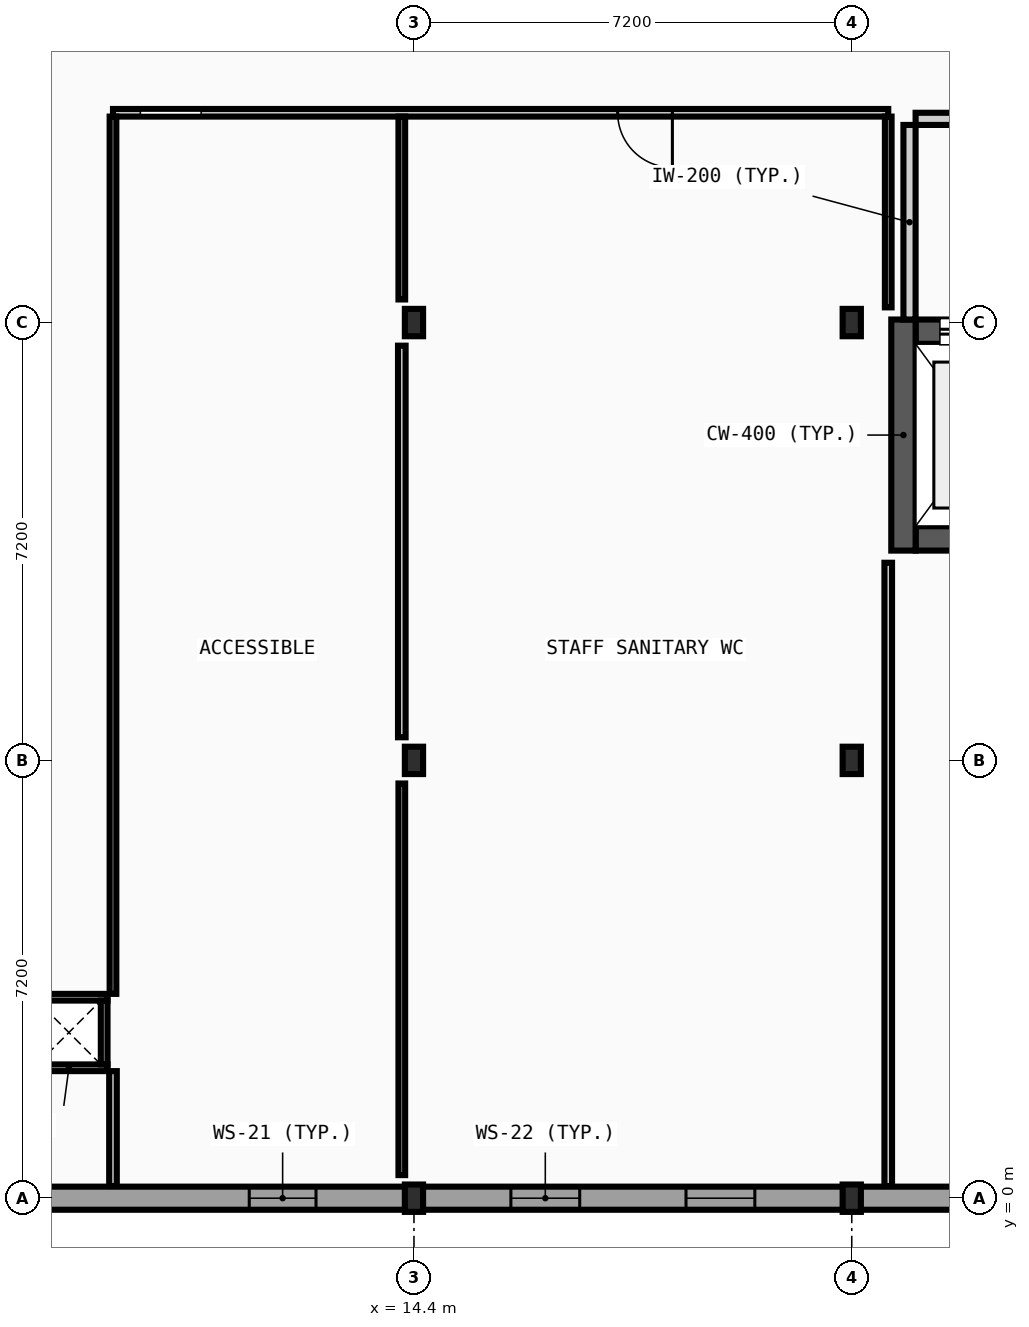
"""IFC4 building model, lengths in metres.
Left out: names, types, materials, properties, quantities, classifications, styles, units other than length and angle.
Written with IfcOpenShell. Run it as: python <this file> out.ifc"""

import sys

from ifc_helpers import new_model, si_unit, direction, frame, frame_2d, origin, origin_2d, place, context, subcontext, project, spatial, rectangle, i_section, extrude, element, fill, save


model = new_model("IFC4")
c1 = context("Model", 3, precision=1e-05, world=origin(), true_north=direction((0.0, 1.0)))
c2 = subcontext(c1, "Body", "Model", "MODEL_VIEW")
j1 = project(units=[si_unit("LENGTHUNIT", "METRE"), si_unit("PLANEANGLEUNIT", "RADIAN")], contexts=[c1])
p1 = place(None, origin())
s1 = spatial("IfcSite", under=j1, at=p1, CompositionType="ELEMENT")
p2 = place(p1, origin())
s2 = spatial("IfcBuilding", under=s1, at=p2, CompositionType="ELEMENT")
p3 = place(p2, frame((0.0, 0.0, 9.6)))
s3 = spatial("IfcBuildingStorey", under=s2, at=p3, CompositionType="ELEMENT", Elevation=9.6)
for number, where, z_axis, x_axis in (
    (1, (14.4, 0.0, 0.0), (0.0, 0.0, 1.0), (1.0, 0.0, 0.0)),
    (2, (14.4, 7.2, 0.0), (0.0, 0.0, 1.0), (1.0, 0.0, 0.0)),
    (3, (14.4, 14.4, 0.0), (0.0, 0.0, 1.0), (1.0, 0.0, 0.0)),
    (4, (21.6, 0.0, 0.0), (0.0, 0.0, 1.0), (1.0, 0.0, 0.0)),
    (5, (21.6, 7.2, 0.0), (0.0, 0.0, 1.0), (1.0, 0.0, 0.0)),
    (6, (21.6, 14.4, 0.0), (0.0, 0.0, 1.0), (1.0, 0.0, 0.0)),
):
    element("IfcColumn", number, at=place(p3, frame(where, z_axis=z_axis, x_axis=x_axis)), inside=s3, PredefinedType="COLUMN", context=c2, shape_type="SweptSolid", body=[
        extrude(i_section(OverallWidth=0.3, OverallDepth=0.45, WebThickness=0.014, FlangeThickness=0.026, FilletRadius=0.027, at=origin_2d()), origin(), (0.0, 0.0, 1.0), 4.4),
    ])
p4 = place(p3, frame((7.2, 0.0, 0.0), z_axis=(0.0, 0.0, 1.0), x_axis=(1.0, 0.0, 0.0)))
e7 = element("IfcWall", 7, at=p4, inside=s3, PredefinedType="STANDARD", context=c2, shape_type="SweptSolid", body=[
    extrude(rectangle(XDim=7.2, YDim=0.38, at=frame_2d((3.6, 0.0))), origin(), (0.0, 0.0, 1.0), 3.895),
])
p5 = place(p4, frame((4.491, 0.0, 0.95)))
e8 = element("IfcOpeningElement", 8, at=p5, cuts=e7, PredefinedType="OPENING", context=c2, shape_type="SweptSolid", body=[
    extrude(rectangle(XDim=1.098, YDim=1.296, at=frame_2d((0.549, 0.648))), frame((0.0, 0.2, 0.0), z_axis=(0.0, -1.0, 0.0), x_axis=(1.0, 0.0, 0.0)), (0.0, 0.0, 1.0), 0.4),
])
p6 = place(p3, frame((14.4, 0.0, 0.0), z_axis=(0.0, 0.0, 1.0), x_axis=(1.0, 0.0, 0.0)))
e9 = element("IfcWall", 9, at=p6, inside=s3, PredefinedType="STANDARD", context=c2, shape_type="SweptSolid", body=[
    extrude(rectangle(XDim=7.2, YDim=0.38, at=frame_2d((3.6, 0.0))), origin(), (0.0, 0.0, 1.0), 3.895),
])
p7 = place(p6, frame((1.594, 0.0, 0.95)))
e10 = element("IfcOpeningElement", 10, at=p7, cuts=e9, PredefinedType="OPENING", context=c2, shape_type="SweptSolid", body=[
    extrude(rectangle(XDim=1.132, YDim=1.296, at=frame_2d((0.566, 0.648))), frame((0.0, 0.2, 0.0), z_axis=(0.0, -1.0, 0.0), x_axis=(1.0, 0.0, 0.0)), (0.0, 0.0, 1.0), 0.4),
])
p8 = place(p6, frame((4.474, 0.0, 0.95)))
e11 = element("IfcOpeningElement", 11, at=p8, cuts=e9, PredefinedType="OPENING", context=c2, shape_type="SweptSolid", body=[
    extrude(rectangle(XDim=1.132, YDim=1.296, at=frame_2d((0.566, 0.648))), frame((0.0, 0.2, 0.0), z_axis=(0.0, -1.0, 0.0), x_axis=(1.0, 0.0, 0.0)), (0.0, 0.0, 1.0), 0.4),
])
p9 = place(p3, frame((21.6, 0.0, 0.0), z_axis=(0.0, 0.0, 1.0), x_axis=(1.0, 0.0, 0.0)))
e12 = element("IfcWall", 12, at=p9, inside=s3, PredefinedType="STANDARD", context=c2, shape_type="SweptSolid", body=[
    extrude(rectangle(XDim=7.01, YDim=0.38, at=frame_2d((3.505, 0.0))), origin(), (0.0, 0.0, 1.0), 3.895),
])
p10 = place(p9, frame((4.324, 0.0, 0.95)))
e13 = element("IfcOpeningElement", 13, at=p10, cuts=e12, PredefinedType="OPENING", context=c2, shape_type="SweptSolid", body=[
    extrude(rectangle(XDim=1.166, YDim=1.296, at=frame_2d((0.583, 0.648))), frame((0.0, 0.2, 0.0), z_axis=(0.0, -1.0, 0.0), x_axis=(1.0, 0.0, 0.0)), (0.0, 0.0, 1.0), 0.4),
])
p11 = place(p3, frame((22.65, 10.85, 0.0), z_axis=(0.0, 0.0, 1.0), x_axis=(1.0, 0.0, 0.0)))
e14 = element("IfcWall", 14, at=p11, inside=s3, PredefinedType="SHEAR", context=c2, shape_type="SweptSolid", body=[
    extrude(rectangle(XDim=2.2, YDim=0.4, at=frame_2d((1.1, 0.0))), origin(), (0.0, 0.0, 1.0), 4.2),
])
p12 = place(p3, frame((22.65, 14.25, 0.0), z_axis=(0.0, 0.0, 1.0), x_axis=(1.0, 0.0, 0.0)))
e15 = element("IfcWall", 15, at=p12, inside=s3, PredefinedType="SHEAR", context=c2, shape_type="SweptSolid", body=[
    extrude(rectangle(XDim=2.2, YDim=0.4, at=frame_2d((1.1, 0.0))), origin(), (0.0, 0.0, 1.0), 4.2),
])
p13 = place(p12, frame((0.4, 0.0, 0.0)))
e16 = element("IfcOpeningElement", 16, at=p13, cuts=e15, PredefinedType="OPENING", context=c2, shape_type="SweptSolid", body=[
    extrude(rectangle(XDim=1.4, YDim=2.2, at=frame_2d((0.7, 1.1))), frame((0.0, 0.21, 0.0), z_axis=(0.0, -1.0, 0.0), x_axis=(1.0, 0.0, 0.0)), (0.0, 0.0, 1.0), 0.42),
])
p14 = place(p3, frame((22.45, 10.65, 0.0), z_axis=(0.0, 0.0, 1.0), x_axis=(0.0, 1.0, 0.0)))
e17 = element("IfcWall", 17, at=p14, inside=s3, PredefinedType="SHEAR", context=c2, shape_type="SweptSolid", body=[
    extrude(rectangle(XDim=3.8, YDim=0.4, at=frame_2d((1.9, 0.0))), origin(), (0.0, 0.0, 1.0), 4.2),
])
p15 = place(p3, frame((22.65, 17.75, 0.0), z_axis=(0.0, 0.0, 1.0), x_axis=(1.0, 0.0, 0.0)))
e18 = element("IfcWall", 18, at=p15, inside=s3, PredefinedType="PARTITIONING", context=c2, shape_type="SweptSolid", body=[
    extrude(rectangle(XDim=5.75, YDim=0.2, at=frame_2d((2.875, 0.0))), origin(), (0.0, 0.0, 1.0), 4.2),
])
p16 = place(p15, frame((2.075, 0.0, 0.0)))
e19 = element("IfcOpeningElement", 19, at=p16, cuts=e18, PredefinedType="OPENING", context=c2, shape_type="SweptSolid", body=[
    extrude(rectangle(XDim=1.6, YDim=2.2, at=frame_2d((0.8, 1.1))), frame((0.0, 0.11, 0.0), z_axis=(0.0, -1.0, 0.0), x_axis=(1.0, 0.0, 0.0)), (0.0, 0.0, 1.0), 0.22),
])
p17 = place(p3, frame((22.55, 14.45, 0.0), z_axis=(0.0, 0.0, 1.0), x_axis=(0.0, 1.0, 0.0)))
e20 = element("IfcWall", 20, at=p17, inside=s3, PredefinedType="PARTITIONING", context=c2, shape_type="SweptSolid", body=[
    extrude(rectangle(XDim=3.2, YDim=0.2, at=frame_2d((1.6, 0.0))), origin(), (0.0, 0.0, 1.0), 4.2),
])
for number, where, z_axis, x_axis in (
    (21, (8.09, 2.145, 0.0), (0.0, 0.0, 1.0), (1.0, 0.0, 0.0)),
    (22, (8.09, 3.305, 0.0), (0.0, 0.0, 1.0), (1.0, 0.0, 0.0)),
):
    element("IfcWall", number, at=place(p3, frame(where, z_axis=z_axis, x_axis=x_axis)), inside=s3, PredefinedType="PARTITIONING", context=c2, shape_type="SweptSolid", body=[
        extrude(rectangle(XDim=1.27, YDim=0.11, at=frame_2d((0.635, 0.0))), origin(), (0.0, 0.0, 1.0), 4.2),
    ])
p18 = place(p3, frame((9.305, 2.2, 0.0), z_axis=(0.0, 0.0, 1.0), x_axis=(0.0, 1.0, 0.0)))
e23 = element("IfcWall", 23, at=p18, inside=s3, PredefinedType="PARTITIONING", context=c2, shape_type="SweptSolid", body=[
    extrude(rectangle(XDim=1.05, YDim=0.11, at=frame_2d((0.525, 0.0))), origin(), (0.0, 0.0, 1.0), 4.2),
])
p19 = place(p3, frame((9.45, 17.85, 0.0), z_axis=(0.0, 0.0, 1.0), x_axis=(1.0, 0.0, 0.0)))
e24 = element("IfcWall", 24, at=p19, inside=s3, PredefinedType="PARTITIONING", context=c2, shape_type="SweptSolid", body=[
    extrude(rectangle(XDim=12.75, YDim=0.125, at=frame_2d((6.375, 0.0))), origin(), (0.0, 0.0, 1.0), 4.2),
])
p20 = place(p19, frame((0.45, 0.0, 0.0)))
e25 = element("IfcOpeningElement", 25, at=p20, cuts=e24, PredefinedType="OPENING", context=c2, shape_type="SweptSolid", body=[
    extrude(rectangle(XDim=1.0, YDim=2.1, at=frame_2d((0.5, 1.05))), frame((0.0, 0.073, 0.0), z_axis=(0.0, -1.0, 0.0), x_axis=(1.0, 0.0, 0.0)), (0.0, 0.0, 1.0), 0.145),
])
p21 = place(p19, frame((8.3, 0.0, 0.0)))
e26 = element("IfcOpeningElement", 26, at=p21, cuts=e24, PredefinedType="OPENING", context=c2, shape_type="SweptSolid", body=[
    extrude(rectangle(XDim=0.9, YDim=2.1, at=frame_2d((0.45, 1.05))), frame((0.0, 0.073, 0.0), z_axis=(0.0, -1.0, 0.0), x_axis=(1.0, 0.0, 0.0)), (0.0, 0.0, 1.0), 0.145),
])
p22 = place(p3, frame((9.45, 0.2, 0.0), z_axis=(0.0, 0.0, 1.0), x_axis=(0.0, 1.0, 0.0)))
e27 = element("IfcWall", 27, at=p22, inside=s3, PredefinedType="PARTITIONING", context=c2, shape_type="SweptSolid", body=[
    extrude(rectangle(XDim=1.89, YDim=0.125, at=frame_2d((0.945, 0.0))), origin(), (0.0, 0.0, 1.0), 3.915),
])
p23 = place(p3, frame((9.45, 3.36, 0.0), z_axis=(0.0, 0.0, 1.0), x_axis=(0.0, 1.0, 0.0)))
e28 = element("IfcWall", 28, at=p23, inside=s3, PredefinedType="PARTITIONING", context=c2, shape_type="SweptSolid", body=[
    extrude(rectangle(XDim=14.427, YDim=0.11, at=frame_2d((7.214, 0.0))), origin(), (0.0, 0.0, 1.0), 3.915),
])
p24 = place(p3, frame((14.2, 0.38, 0.0), z_axis=(0.0, 0.0, 1.0), x_axis=(0.0, 1.0, 0.0)))
e29 = element("IfcWall", 29, at=p24, inside=s3, PredefinedType="PARTITIONING", context=c2, shape_type="SweptSolid", body=[
    extrude(rectangle(XDim=6.44, YDim=0.11, at=frame_2d((3.22, 0.0))), origin(), (0.0, 0.0, 1.0), 3.895),
])
p25 = place(p3, frame((14.2, 7.58, 0.0), z_axis=(0.0, 0.0, 1.0), x_axis=(0.0, 1.0, 0.0)))
e30 = element("IfcWall", 30, at=p25, inside=s3, PredefinedType="PARTITIONING", context=c2, shape_type="SweptSolid", body=[
    extrude(rectangle(XDim=6.44, YDim=0.125, at=frame_2d((3.22, 0.0))), origin(), (0.0, 0.0, 1.0), 3.895),
])
p26 = place(p3, frame((14.2, 14.78, 0.0), z_axis=(0.0, 0.0, 1.0), x_axis=(0.0, 1.0, 0.0)))
e31 = element("IfcWall", 31, at=p26, inside=s3, PredefinedType="PARTITIONING", context=c2, shape_type="SweptSolid", body=[
    extrude(rectangle(XDim=3.008, YDim=0.11, at=frame_2d((1.504, 0.0))), origin(), (0.0, 0.0, 1.0), 3.895),
])
p27 = place(p3, frame((22.2, 0.2, 0.0), z_axis=(0.0, 0.0, 1.0), x_axis=(0.0, 1.0, 0.0)))
e32 = element("IfcWall", 32, at=p27, inside=s3, PredefinedType="PARTITIONING", context=c2, shape_type="SweptSolid", body=[
    extrude(rectangle(XDim=10.25, YDim=0.125, at=frame_2d((5.125, 0.0))), origin(), (0.0, 0.0, 1.0), 4.2),
])
p28 = place(p3, frame((22.2, 14.65, 0.0), z_axis=(0.0, 0.0, 1.0), x_axis=(0.0, 1.0, 0.0)))
e33 = element("IfcWall", 33, at=p28, inside=s3, PredefinedType="PARTITIONING", context=c2, shape_type="SweptSolid", body=[
    extrude(rectangle(XDim=3.138, YDim=0.11, at=frame_2d((1.569, 0.0))), origin(), (0.0, 0.0, 1.0), 4.2),
])
p29 = place(p5, origin())
e34 = element("IfcWindow", 34, at=p29, inside=s3, PartitioningType="SINGLE_PANEL", PredefinedType="WINDOW", context=c2, shape_type="SweptSolid", body=[
    extrude(rectangle(XDim=1.098, YDim=1.296, at=frame_2d((0.549, 0.648))), frame((0.0, 0.03, 0.0), z_axis=(0.0, -1.0, 0.0), x_axis=(1.0, 0.0, 0.0)), (0.0, 0.0, 1.0), 0.06),
])
fill(e8, e34)
p30 = place(p7, origin())
e35 = element("IfcWindow", 35, at=p30, inside=s3, PartitioningType="SINGLE_PANEL", PredefinedType="WINDOW", context=c2, shape_type="SweptSolid", body=[
    extrude(rectangle(XDim=1.132, YDim=1.296, at=frame_2d((0.566, 0.648))), frame((0.0, 0.03, 0.0), z_axis=(0.0, -1.0, 0.0), x_axis=(1.0, 0.0, 0.0)), (0.0, 0.0, 1.0), 0.06),
])
fill(e10, e35)
p31 = place(p8, origin())
e36 = element("IfcWindow", 36, at=p31, inside=s3, PartitioningType="SINGLE_PANEL", PredefinedType="WINDOW", context=c2, shape_type="SweptSolid", body=[
    extrude(rectangle(XDim=1.132, YDim=1.296, at=frame_2d((0.566, 0.648))), frame((0.0, 0.03, 0.0), z_axis=(0.0, -1.0, 0.0), x_axis=(1.0, 0.0, 0.0)), (0.0, 0.0, 1.0), 0.06),
])
fill(e11, e36)
p32 = place(p13, origin())
e37 = element("IfcDoor", 37, at=p32, inside=s3, OperationType="SLIDING_TO_LEFT", PredefinedType="DOOR", context=c2, shape_type="SweptSolid", body=[
    extrude(rectangle(XDim=1.4, YDim=2.2, at=frame_2d((0.7, 1.1))), frame((0.0, 0.025, 0.0), z_axis=(0.0, -1.0, 0.0), x_axis=(1.0, 0.0, 0.0)), (0.0, 0.0, 1.0), 0.05),
])
fill(e16, e37)
p33 = place(p20, origin())
e38 = element("IfcDoor", 38, at=p33, inside=s3, OperationType="SLIDING_TO_LEFT", PredefinedType="DOOR", context=c2, shape_type="SweptSolid", body=[
    extrude(rectangle(XDim=1.0, YDim=2.1, at=frame_2d((0.5, 1.05))), frame((0.0, 0.025, 0.0), z_axis=(0.0, -1.0, 0.0), x_axis=(1.0, 0.0, 0.0)), (0.0, 0.0, 1.0), 0.05),
])
fill(e25, e38)
p34 = place(p21, origin())
e39 = element("IfcDoor", 39, at=p34, inside=s3, OperationType="SINGLE_SWING_RIGHT", PredefinedType="DOOR", context=c2, shape_type="SweptSolid", body=[
    extrude(rectangle(XDim=0.9, YDim=2.1, at=frame_2d((0.45, 1.05))), frame((0.0, 0.025, 0.0), z_axis=(0.0, -1.0, 0.0), x_axis=(1.0, 0.0, 0.0)), (0.0, 0.0, 1.0), 0.05),
])
fill(e26, e39)
save(model, sys.argv[1])
